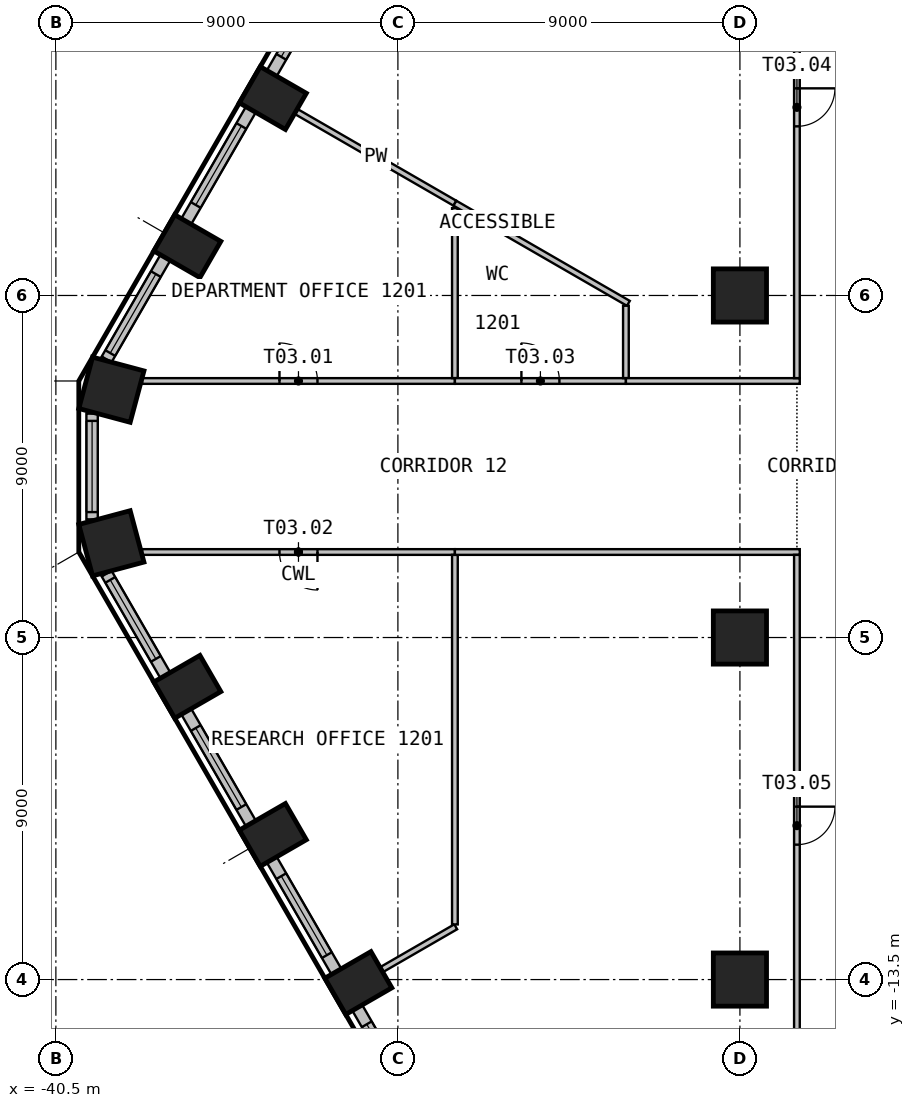
"""IFC4 building model, lengths in metres.
Left out: names, types, materials, properties, quantities, classifications, styles, units other than length and angle.
Written with IfcOpenShell. Run it as: python <this file> out.ifc"""

import sys

from ifc_helpers import new_model, si_unit, direction, frame, frame_2d, origin, origin_2d, place, context, subcontext, project, spatial, rectangle, circle, extrude, element, fill, save


model = new_model("IFC4")
c1 = context("Model", 3, precision=1e-05, world=origin(), true_north=direction((0.0, 1.0)))
c2 = subcontext(c1, "Body", "Model", "MODEL_VIEW")
j1 = project(units=[si_unit("LENGTHUNIT", "METRE"), si_unit("PLANEANGLEUNIT", "RADIAN")], contexts=[c1])
p1 = place(None, origin())
s1 = spatial("IfcSite", under=j1, at=p1, CompositionType="ELEMENT")
p2 = place(p1, origin())
s2 = spatial("IfcBuilding", under=s1, at=p2, CompositionType="ELEMENT")
p3 = place(p2, frame((0.0, 0.0, 53.4)))
s3 = spatial("IfcBuildingStorey", under=s2, at=p3, CompositionType="ELEMENT", Elevation=53.4)
for number, where, z_axis, x_axis in (
    (1, (-34.791, 9.694, 0.0), (0.0, 0.0, 1.0), (-0.5, -0.866, 0.0)),
    (2, (-37.041, 5.797, 0.0), (0.0, 0.0, 1.0), (-0.5, -0.866, 0.0)),
):
    element("IfcColumn", number, at=place(p3, frame(where, z_axis=z_axis, x_axis=x_axis)), inside=s3, PredefinedType="COLUMN", context=c2, shape_type="SweptSolid", body=[
        extrude(rectangle(XDim=1.1, YDim=1.4, at=origin_2d()), origin(), (0.0, 0.0, 1.0), 3.525),
    ])
for number, where, z_axis, x_axis in (
    (3, (-39.04, 2.02, 0.0), (0.0, 0.0, 1.0), (-0.259, -0.966, 0.0)),
    (4, (-39.04, -2.02, 0.0), (0.0, 0.0, 1.0), (0.259, -0.966, 0.0)),
):
    element("IfcColumn", number, at=place(p3, frame(where, z_axis=z_axis, x_axis=x_axis)), inside=s3, PredefinedType="COLUMN", context=c2, shape_type="SweptSolid", body=[
        extrude(rectangle(XDim=1.4, YDim=1.4, at=origin_2d()), origin(), (0.0, 0.0, 1.0), 3.525),
    ])
for number, where, z_axis, x_axis in (
    (5, (-37.041, -5.797, 0.0), (0.0, 0.0, 1.0), (0.5, -0.866, 0.0)),
    (6, (-34.791, -9.694, 0.0), (0.0, 0.0, 1.0), (0.5, -0.866, 0.0)),
    (7, (-32.541, -13.591, 0.0), (0.0, 0.0, 1.0), (0.5, -0.866, 0.0)),
):
    element("IfcColumn", number, at=place(p3, frame(where, z_axis=z_axis, x_axis=x_axis)), inside=s3, PredefinedType="COLUMN", context=c2, shape_type="SweptSolid", body=[
        extrude(rectangle(XDim=1.1, YDim=1.4, at=origin_2d()), origin(), (0.0, 0.0, 1.0), 3.525),
    ])
for number, where, z_axis, x_axis in (
    (8, (-22.5, -13.5, 0.0), (0.0, 0.0, 1.0), (1.0, 0.0, 0.0)),
    (9, (-22.5, -4.5, 0.0), (0.0, 0.0, 1.0), (1.0, 0.0, 0.0)),
    (10, (-22.5, 4.5, 0.0), (0.0, 0.0, 1.0), (1.0, 0.0, 0.0)),
):
    element("IfcColumn", number, at=place(p3, frame(where, z_axis=z_axis, x_axis=x_axis)), inside=s3, PredefinedType="COLUMN", context=c2, shape_type="SweptSolid", body=[
        extrude(circle(Radius=0.7, at=origin_2d()), origin(), (0.0, 0.0, 1.0), 3.525),
    ])
p4 = place(p3, frame((-33.119, 13.29, 0.0), z_axis=(0.0, 0.0, 1.0), x_axis=(-0.499993955907, -0.866028893315, 0.0)))
e11 = element("IfcWall", 11, at=p4, inside=s3, PredefinedType="SOLIDWALL", context=c2, shape_type="SweptSolid", body=[
    extrude(rectangle(XDim=3.399, YDim=0.3, at=frame_2d((1.699, 0.0))), origin(), (0.0, 0.0, 1.0), 3.525),
])
p5 = place(p4, frame((0.5, 0.0, 0.9)))
e12 = element("IfcOpeningElement", 12, at=p5, cuts=e11, PredefinedType="OPENING", context=c2, shape_type="SweptSolid", body=[
    extrude(rectangle(XDim=2.4, YDim=2.1, at=frame_2d((1.2, 1.05))), frame((0.0, 0.16, 0.0), z_axis=(0.0, -1.0, 0.0), x_axis=(1.0, 0.0, 0.0)), (0.0, 0.0, 1.0), 0.32),
])
p6 = place(p3, frame((-35.369, 9.393, 0.0), z_axis=(0.0, 0.0, 1.0), x_axis=(-0.499993955907, -0.866028893315, 0.0)))
e13 = element("IfcWall", 13, at=p6, inside=s3, PredefinedType="SOLIDWALL", context=c2, shape_type="SweptSolid", body=[
    extrude(rectangle(XDim=3.399, YDim=0.3, at=frame_2d((1.699, 0.0))), origin(), (0.0, 0.0, 1.0), 3.525),
])
p7 = place(p6, frame((0.5, 0.0, 0.9)))
e14 = element("IfcOpeningElement", 14, at=p7, cuts=e13, PredefinedType="OPENING", context=c2, shape_type="SweptSolid", body=[
    extrude(rectangle(XDim=2.4, YDim=2.1, at=frame_2d((1.2, 1.05))), frame((0.0, 0.16, 0.0), z_axis=(0.0, -1.0, 0.0), x_axis=(1.0, 0.0, 0.0)), (0.0, 0.0, 1.0), 0.32),
])
p8 = place(p3, frame((-37.619, 5.495, 0.0), z_axis=(0.0, 0.0, 1.0), x_axis=(-0.49997090907, -0.866042198789, 0.0)))
e15 = element("IfcWall", 15, at=p8, inside=s3, PredefinedType="SOLIDWALL", context=c2, shape_type="SweptSolid", body=[
    extrude(rectangle(XDim=3.091, YDim=0.3, at=frame_2d((1.545, 0.0))), origin(), (0.0, 0.0, 1.0), 3.525),
])
p9 = place(p8, frame((0.5, 0.0, 0.9)))
e16 = element("IfcOpeningElement", 16, at=p9, cuts=e15, PredefinedType="OPENING", context=c2, shape_type="SweptSolid", body=[
    extrude(rectangle(XDim=2.4, YDim=2.1, at=frame_2d((1.2, 1.05))), frame((0.0, 0.16, 0.0), z_axis=(0.0, -1.0, 0.0), x_axis=(1.0, 0.0, 0.0)), (0.0, 0.0, 1.0), 0.32),
])
p10 = place(p3, frame((-39.547, 1.391, 0.0), z_axis=(0.0, 0.0, 1.0), x_axis=(0.0, -1.0, 0.0)))
e17 = element("IfcWall", 17, at=p10, inside=s3, PredefinedType="SOLIDWALL", context=c2, shape_type="SweptSolid", body=[
    extrude(rectangle(XDim=2.782, YDim=0.3, at=frame_2d((1.391, 0.0))), origin(), (0.0, 0.0, 1.0), 3.525),
])
p11 = place(p10, frame((0.191, 0.0, 0.9)))
e18 = element("IfcOpeningElement", 18, at=p11, cuts=e17, PredefinedType="OPENING", context=c2, shape_type="SweptSolid", body=[
    extrude(rectangle(XDim=2.4, YDim=2.1, at=frame_2d((1.2, 1.05))), frame((0.0, 0.16, 0.0), z_axis=(0.0, -1.0, 0.0), x_axis=(1.0, 0.0, 0.0)), (0.0, 0.0, 1.0), 0.32),
])
p12 = place(p3, frame((-39.165, -2.819, 0.0), z_axis=(0.0, 0.0, 1.0), x_axis=(0.49997090907, -0.866042198789, 0.0)))
e19 = element("IfcWall", 19, at=p12, inside=s3, PredefinedType="SOLIDWALL", context=c2, shape_type="SweptSolid", body=[
    extrude(rectangle(XDim=3.091, YDim=0.3, at=frame_2d((1.545, 0.0))), origin(), (0.0, 0.0, 1.0), 3.525),
])
p13 = place(p12, frame((0.191, 0.0, 0.9)))
e20 = element("IfcOpeningElement", 20, at=p13, cuts=e19, PredefinedType="OPENING", context=c2, shape_type="SweptSolid", body=[
    extrude(rectangle(XDim=2.4, YDim=2.1, at=frame_2d((1.2, 1.05))), frame((0.0, 0.16, 0.0), z_axis=(0.0, -1.0, 0.0), x_axis=(1.0, 0.0, 0.0)), (0.0, 0.0, 1.0), 0.32),
])
p14 = place(p3, frame((-37.069, -6.449, 0.0), z_axis=(0.0, 0.0, 1.0), x_axis=(0.499993955907, -0.866028893315, 0.0)))
e21 = element("IfcWall", 21, at=p14, inside=s3, PredefinedType="SOLIDWALL", context=c2, shape_type="SweptSolid", body=[
    extrude(rectangle(XDim=3.399, YDim=0.3, at=frame_2d((1.699, 0.0))), origin(), (0.0, 0.0, 1.0), 3.525),
])
p15 = place(p14, frame((0.5, 0.0, 0.9)))
e22 = element("IfcOpeningElement", 22, at=p15, cuts=e21, PredefinedType="OPENING", context=c2, shape_type="SweptSolid", body=[
    extrude(rectangle(XDim=2.4, YDim=2.1, at=frame_2d((1.2, 1.05))), frame((0.0, 0.16, 0.0), z_axis=(0.0, -1.0, 0.0), x_axis=(1.0, 0.0, 0.0)), (0.0, 0.0, 1.0), 0.32),
])
p16 = place(p3, frame((-34.819, -10.346, 0.0), z_axis=(0.0, 0.0, 1.0), x_axis=(0.499993955907, -0.866028893315, 0.0)))
e23 = element("IfcWall", 23, at=p16, inside=s3, PredefinedType="SOLIDWALL", context=c2, shape_type="SweptSolid", body=[
    extrude(rectangle(XDim=3.399, YDim=0.3, at=frame_2d((1.699, 0.0))), origin(), (0.0, 0.0, 1.0), 3.525),
])
p17 = place(p16, frame((0.5, 0.0, 0.9)))
e24 = element("IfcOpeningElement", 24, at=p17, cuts=e23, PredefinedType="OPENING", context=c2, shape_type="SweptSolid", body=[
    extrude(rectangle(XDim=2.4, YDim=2.1, at=frame_2d((1.2, 1.05))), frame((0.0, 0.16, 0.0), z_axis=(0.0, -1.0, 0.0), x_axis=(1.0, 0.0, 0.0)), (0.0, 0.0, 1.0), 0.32),
])
p18 = place(p3, frame((-32.569, -14.243, 0.0), z_axis=(0.0, 0.0, 1.0), x_axis=(0.499993955907, -0.866028893315, 0.0)))
e25 = element("IfcWall", 25, at=p18, inside=s3, PredefinedType="SOLIDWALL", context=c2, shape_type="SweptSolid", body=[
    extrude(rectangle(XDim=3.399, YDim=0.3, at=frame_2d((1.699, 0.0))), origin(), (0.0, 0.0, 1.0), 3.525),
])
p19 = place(p18, frame((0.5, 0.0, 0.9)))
e26 = element("IfcOpeningElement", 26, at=p19, cuts=e25, PredefinedType="OPENING", context=c2, shape_type="SweptSolid", body=[
    extrude(rectangle(XDim=2.4, YDim=2.1, at=frame_2d((1.2, 1.05))), frame((0.0, 0.16, 0.0), z_axis=(0.0, -1.0, 0.0), x_axis=(1.0, 0.0, 0.0)), (0.0, 0.0, 1.0), 0.32),
])
p20 = place(p3, frame((-30.0, -2.25, 0.0), z_axis=(0.0, 0.0, 1.0), x_axis=(-1.0, 0.0, 0.0)))
e27 = element("IfcWall", 27, at=p20, inside=s3, PredefinedType="PARTITIONING", context=c2, shape_type="SweptSolid", body=[
    extrude(rectangle(XDim=8.233, YDim=0.15, at=frame_2d((4.116, 0.0))), origin(), (0.0, 0.0, 1.0), 3.525),
])
p21 = place(p20, frame((3.616, 0.0, 0.0)))
e28 = element("IfcOpeningElement", 28, at=p21, cuts=e27, PredefinedType="OPENING", context=c2, shape_type="SweptSolid", body=[
    extrude(rectangle(XDim=1.0, YDim=2.1, at=frame_2d((0.5, 1.05))), frame((0.0, 0.085, 0.0), z_axis=(0.0, -1.0, 0.0), x_axis=(1.0, 0.0, 0.0)), (0.0, 0.0, 1.0), 0.17),
])
p22 = place(p3, frame((-38.233, 2.25, 0.0), z_axis=(0.0, 0.0, 1.0), x_axis=(1.0, 0.0, 0.0)))
e29 = element("IfcWall", 29, at=p22, inside=s3, PredefinedType="PARTITIONING", context=c2, shape_type="SweptSolid", body=[
    extrude(rectangle(XDim=8.233, YDim=0.15, at=frame_2d((4.116, 0.0))), origin(), (0.0, 0.0, 1.0), 3.525),
])
p23 = place(p22, frame((3.616, 0.0, 0.0)))
e30 = element("IfcOpeningElement", 30, at=p23, cuts=e29, PredefinedType="OPENING", context=c2, shape_type="SweptSolid", body=[
    extrude(rectangle(XDim=1.0, YDim=2.1, at=frame_2d((0.5, 1.05))), frame((0.0, 0.085, 0.0), z_axis=(0.0, -1.0, 0.0), x_axis=(1.0, 0.0, 0.0)), (0.0, 0.0, 1.0), 0.17),
])
p24 = place(p3, frame((-34.167, 9.334, 0.0), z_axis=(0.0, 0.0, 1.0), x_axis=(0.866011543723, -0.500024005562, 0.0)))
e31 = element("IfcWall", 31, at=p24, inside=s3, PredefinedType="PARTITIONING", context=c2, shape_type="SweptSolid", body=[
    extrude(rectangle(XDim=4.812, YDim=0.15, at=frame_2d((2.406, 0.0))), origin(), (0.0, 0.0, 1.0), 3.525),
])
p25 = place(p3, frame((-29.978, -12.112, 0.0), z_axis=(0.0, 0.0, 1.0), x_axis=(-0.866020361036, -0.500008734195, 0.0)))
e32 = element("IfcWall", 32, at=p25, inside=s3, PredefinedType="PARTITIONING", context=c2, shape_type="SweptSolid", body=[
    extrude(rectangle(XDim=2.239, YDim=0.15, at=frame_2d((1.12, 0.0))), origin(), (0.0, 0.0, 1.0), 3.525),
])
p26 = place(p3, frame((-30.0, -2.325, 0.0), z_axis=(0.0, 0.0, 1.0), x_axis=(0.0, -1.0, 0.0)))
e33 = element("IfcWall", 33, at=p26, inside=s3, PredefinedType="PARTITIONING", context=c2, shape_type="SweptSolid", body=[
    extrude(rectangle(XDim=9.724, YDim=0.15, at=frame_2d((4.862, 0.0))), origin(), (0.0, 0.0, 1.0), 3.525),
])
p27 = place(p3, frame((-20.925, -2.25, 0.0), z_axis=(0.0, 0.0, 1.0), x_axis=(-1.0, 0.0, 0.0)))
e34 = element("IfcWall", 34, at=p27, inside=s3, PredefinedType="PARTITIONING", context=c2, shape_type="SweptSolid", body=[
    extrude(rectangle(XDim=9.075, YDim=0.15, at=frame_2d((4.538, 0.0))), origin(), (0.0, 0.0, 1.0), 3.525),
])
p28 = place(p3, frame((-30.0, 6.798, 0.0), z_axis=(0.0, 0.0, 1.0), x_axis=(0.0, -1.0, 0.0)))
e35 = element("IfcWall", 35, at=p28, inside=s3, PredefinedType="PARTITIONING", context=c2, shape_type="SweptSolid", body=[
    extrude(rectangle(XDim=4.473, YDim=0.15, at=frame_2d((2.237, 0.0))), origin(), (0.0, 0.0, 1.0), 3.525),
])
p29 = place(p3, frame((-30.0, 2.25, 0.0), z_axis=(0.0, 0.0, 1.0), x_axis=(1.0, 0.0, 0.0)))
e36 = element("IfcWall", 36, at=p29, inside=s3, PredefinedType="PARTITIONING", context=c2, shape_type="SweptSolid", body=[
    extrude(rectangle(XDim=4.5, YDim=0.15, at=frame_2d((2.25, 0.0))), origin(), (0.0, 0.0, 1.0), 3.525),
])
p30 = place(p29, frame((1.75, 0.0, 0.0)))
e37 = element("IfcOpeningElement", 37, at=p30, cuts=e36, PredefinedType="OPENING", context=c2, shape_type="SweptSolid", body=[
    extrude(rectangle(XDim=1.0, YDim=2.1, at=frame_2d((0.5, 1.05))), frame((0.0, 0.085, 0.0), z_axis=(0.0, -1.0, 0.0), x_axis=(1.0, 0.0, 0.0)), (0.0, 0.0, 1.0), 0.17),
])
p31 = place(p3, frame((-30.0, 6.928, 0.0), z_axis=(0.0, 0.0, 1.0), x_axis=(0.866031326857, -0.499989740797, 0.0)))
e38 = element("IfcWall", 38, at=p31, inside=s3, PredefinedType="PARTITIONING", context=c2, shape_type="SweptSolid", body=[
    extrude(rectangle(XDim=5.271, YDim=0.15, at=frame_2d((2.635, 0.0))), origin(), (0.0, 0.0, 1.0), 3.525),
])
p32 = place(p3, frame((-25.5, 4.23, 0.0), z_axis=(0.0, 0.0, 1.0), x_axis=(0.0, -1.0, 0.0)))
e39 = element("IfcWall", 39, at=p32, inside=s3, PredefinedType="PARTITIONING", context=c2, shape_type="SweptSolid", body=[
    extrude(rectangle(XDim=1.905, YDim=0.15, at=frame_2d((0.953, 0.0))), origin(), (0.0, 0.0, 1.0), 3.525),
])
p33 = place(p3, frame((-25.5, 2.25, 0.0), z_axis=(0.0, 0.0, 1.0), x_axis=(1.0, 0.0, 0.0)))
e40 = element("IfcWall", 40, at=p33, inside=s3, PredefinedType="PARTITIONING", context=c2, shape_type="SweptSolid", body=[
    extrude(rectangle(XDim=4.575, YDim=0.15, at=frame_2d((2.288, 0.0))), origin(), (0.0, 0.0, 1.0), 3.525),
])
p34 = place(p3, frame((-21.0, -2.325, 0.0), z_axis=(0.0, 0.0, 1.0), x_axis=(0.0, -1.0, 0.0)))
e41 = element("IfcWall", 41, at=p34, inside=s3, PredefinedType="PARTITIONING", context=c2, shape_type="SweptSolid", body=[
    extrude(rectangle(XDim=14.25, YDim=0.15, at=frame_2d((7.125, 0.0))), origin(), (0.0, 0.0, 1.0), 3.525),
])
p35 = place(p34, frame((6.625, 0.0, 0.0)))
e42 = element("IfcOpeningElement", 42, at=p35, cuts=e41, PredefinedType="OPENING", context=c2, shape_type="SweptSolid", body=[
    extrude(rectangle(XDim=1.0, YDim=2.1, at=frame_2d((0.5, 1.05))), frame((0.0, 0.085, 0.0), z_axis=(0.0, -1.0, 0.0), x_axis=(1.0, 0.0, 0.0)), (0.0, 0.0, 1.0), 0.17),
])
p36 = place(p3, frame((-21.0, 16.575, 0.0), z_axis=(0.0, 0.0, 1.0), x_axis=(0.0, -1.0, 0.0)))
e43 = element("IfcWall", 43, at=p36, inside=s3, PredefinedType="PARTITIONING", context=c2, shape_type="SweptSolid", body=[
    extrude(rectangle(XDim=14.25, YDim=0.15, at=frame_2d((7.125, 0.0))), origin(), (0.0, 0.0, 1.0), 3.525),
])
p37 = place(p36, frame((6.625, 0.0, 0.0)))
e44 = element("IfcOpeningElement", 44, at=p37, cuts=e43, PredefinedType="OPENING", context=c2, shape_type="SweptSolid", body=[
    extrude(rectangle(XDim=1.0, YDim=2.1, at=frame_2d((0.5, 1.05))), frame((0.0, 0.085, 0.0), z_axis=(0.0, -1.0, 0.0), x_axis=(1.0, 0.0, 0.0)), (0.0, 0.0, 1.0), 0.17),
])
p38 = place(p5, origin())
e45 = element("IfcWindow", 45, at=p38, inside=s3, PartitioningType="SINGLE_PANEL", PredefinedType="WINDOW", context=c2, shape_type="SweptSolid", body=[
    extrude(rectangle(XDim=2.4, YDim=2.1, at=frame_2d((1.2, 1.05))), frame((0.0, 0.03, 0.0), z_axis=(0.0, -1.0, 0.0), x_axis=(1.0, 0.0, 0.0)), (0.0, 0.0, 1.0), 0.06),
])
fill(e12, e45)
p39 = place(p7, origin())
e46 = element("IfcWindow", 46, at=p39, inside=s3, PartitioningType="SINGLE_PANEL", PredefinedType="WINDOW", context=c2, shape_type="SweptSolid", body=[
    extrude(rectangle(XDim=2.4, YDim=2.1, at=frame_2d((1.2, 1.05))), frame((0.0, 0.03, 0.0), z_axis=(0.0, -1.0, 0.0), x_axis=(1.0, 0.0, 0.0)), (0.0, 0.0, 1.0), 0.06),
])
fill(e14, e46)
p40 = place(p9, origin())
e47 = element("IfcWindow", 47, at=p40, inside=s3, PartitioningType="SINGLE_PANEL", PredefinedType="WINDOW", context=c2, shape_type="SweptSolid", body=[
    extrude(rectangle(XDim=2.4, YDim=2.1, at=frame_2d((1.2, 1.05))), frame((0.0, 0.03, 0.0), z_axis=(0.0, -1.0, 0.0), x_axis=(1.0, 0.0, 0.0)), (0.0, 0.0, 1.0), 0.06),
])
fill(e16, e47)
p41 = place(p11, origin())
e48 = element("IfcWindow", 48, at=p41, inside=s3, PartitioningType="SINGLE_PANEL", PredefinedType="WINDOW", context=c2, shape_type="SweptSolid", body=[
    extrude(rectangle(XDim=2.4, YDim=2.1, at=frame_2d((1.2, 1.05))), frame((0.0, 0.03, 0.0), z_axis=(0.0, -1.0, 0.0), x_axis=(1.0, 0.0, 0.0)), (0.0, 0.0, 1.0), 0.06),
])
fill(e18, e48)
p42 = place(p13, origin())
e49 = element("IfcWindow", 49, at=p42, inside=s3, PartitioningType="SINGLE_PANEL", PredefinedType="WINDOW", context=c2, shape_type="SweptSolid", body=[
    extrude(rectangle(XDim=2.4, YDim=2.1, at=frame_2d((1.2, 1.05))), frame((0.0, 0.03, 0.0), z_axis=(0.0, -1.0, 0.0), x_axis=(1.0, 0.0, 0.0)), (0.0, 0.0, 1.0), 0.06),
])
fill(e20, e49)
p43 = place(p15, origin())
e50 = element("IfcWindow", 50, at=p43, inside=s3, PartitioningType="SINGLE_PANEL", PredefinedType="WINDOW", context=c2, shape_type="SweptSolid", body=[
    extrude(rectangle(XDim=2.4, YDim=2.1, at=frame_2d((1.2, 1.05))), frame((0.0, 0.03, 0.0), z_axis=(0.0, -1.0, 0.0), x_axis=(1.0, 0.0, 0.0)), (0.0, 0.0, 1.0), 0.06),
])
fill(e22, e50)
p44 = place(p17, origin())
e51 = element("IfcWindow", 51, at=p44, inside=s3, PartitioningType="SINGLE_PANEL", PredefinedType="WINDOW", context=c2, shape_type="SweptSolid", body=[
    extrude(rectangle(XDim=2.4, YDim=2.1, at=frame_2d((1.2, 1.05))), frame((0.0, 0.03, 0.0), z_axis=(0.0, -1.0, 0.0), x_axis=(1.0, 0.0, 0.0)), (0.0, 0.0, 1.0), 0.06),
])
fill(e24, e51)
p45 = place(p19, origin())
e52 = element("IfcWindow", 52, at=p45, inside=s3, PartitioningType="SINGLE_PANEL", PredefinedType="WINDOW", context=c2, shape_type="SweptSolid", body=[
    extrude(rectangle(XDim=2.4, YDim=2.1, at=frame_2d((1.2, 1.05))), frame((0.0, 0.03, 0.0), z_axis=(0.0, -1.0, 0.0), x_axis=(1.0, 0.0, 0.0)), (0.0, 0.0, 1.0), 0.06),
])
fill(e26, e52)
p46 = place(p23, origin())
e53 = element("IfcDoor", 53, at=p46, inside=s3, OperationType="SINGLE_SWING_LEFT", PredefinedType="DOOR", context=c2, shape_type="SweptSolid", body=[
    extrude(rectangle(XDim=1.0, YDim=2.1, at=frame_2d((0.5, 1.05))), frame((0.0, 0.025, 0.0), z_axis=(0.0, -1.0, 0.0), x_axis=(1.0, 0.0, 0.0)), (0.0, 0.0, 1.0), 0.05),
])
fill(e30, e53)
p47 = place(p21, origin())
e54 = element("IfcDoor", 54, at=p47, inside=s3, OperationType="SINGLE_SWING_RIGHT", PredefinedType="DOOR", context=c2, shape_type="SweptSolid", body=[
    extrude(rectangle(XDim=1.0, YDim=2.1, at=frame_2d((0.5, 1.05))), frame((0.0, 0.025, 0.0), z_axis=(0.0, -1.0, 0.0), x_axis=(1.0, 0.0, 0.0)), (0.0, 0.0, 1.0), 0.05),
])
fill(e28, e54)
p48 = place(p30, origin())
e55 = element("IfcDoor", 55, at=p48, inside=s3, OperationType="SINGLE_SWING_RIGHT", PredefinedType="DOOR", context=c2, shape_type="SweptSolid", body=[
    extrude(rectangle(XDim=1.0, YDim=2.1, at=frame_2d((0.5, 1.05))), frame((0.0, 0.025, 0.0), z_axis=(0.0, -1.0, 0.0), x_axis=(1.0, 0.0, 0.0)), (0.0, 0.0, 1.0), 0.05),
])
fill(e37, e55)
p49 = place(p37, origin())
e56 = element("IfcDoor", 56, at=p49, inside=s3, OperationType="SINGLE_SWING_LEFT", PredefinedType="DOOR", context=c2, shape_type="SweptSolid", body=[
    extrude(rectangle(XDim=1.0, YDim=2.1, at=frame_2d((0.5, 1.05))), frame((0.0, 0.025, 0.0), z_axis=(0.0, -1.0, 0.0), x_axis=(1.0, 0.0, 0.0)), (0.0, 0.0, 1.0), 0.05),
])
fill(e44, e56)
p50 = place(p35, origin())
e57 = element("IfcDoor", 57, at=p50, inside=s3, OperationType="SINGLE_SWING_RIGHT", PredefinedType="DOOR", context=c2, shape_type="SweptSolid", body=[
    extrude(rectangle(XDim=1.0, YDim=2.1, at=frame_2d((0.5, 1.05))), frame((0.0, 0.025, 0.0), z_axis=(0.0, -1.0, 0.0), x_axis=(1.0, 0.0, 0.0)), (0.0, 0.0, 1.0), 0.05),
])
fill(e42, e57)
save(model, sys.argv[1])
